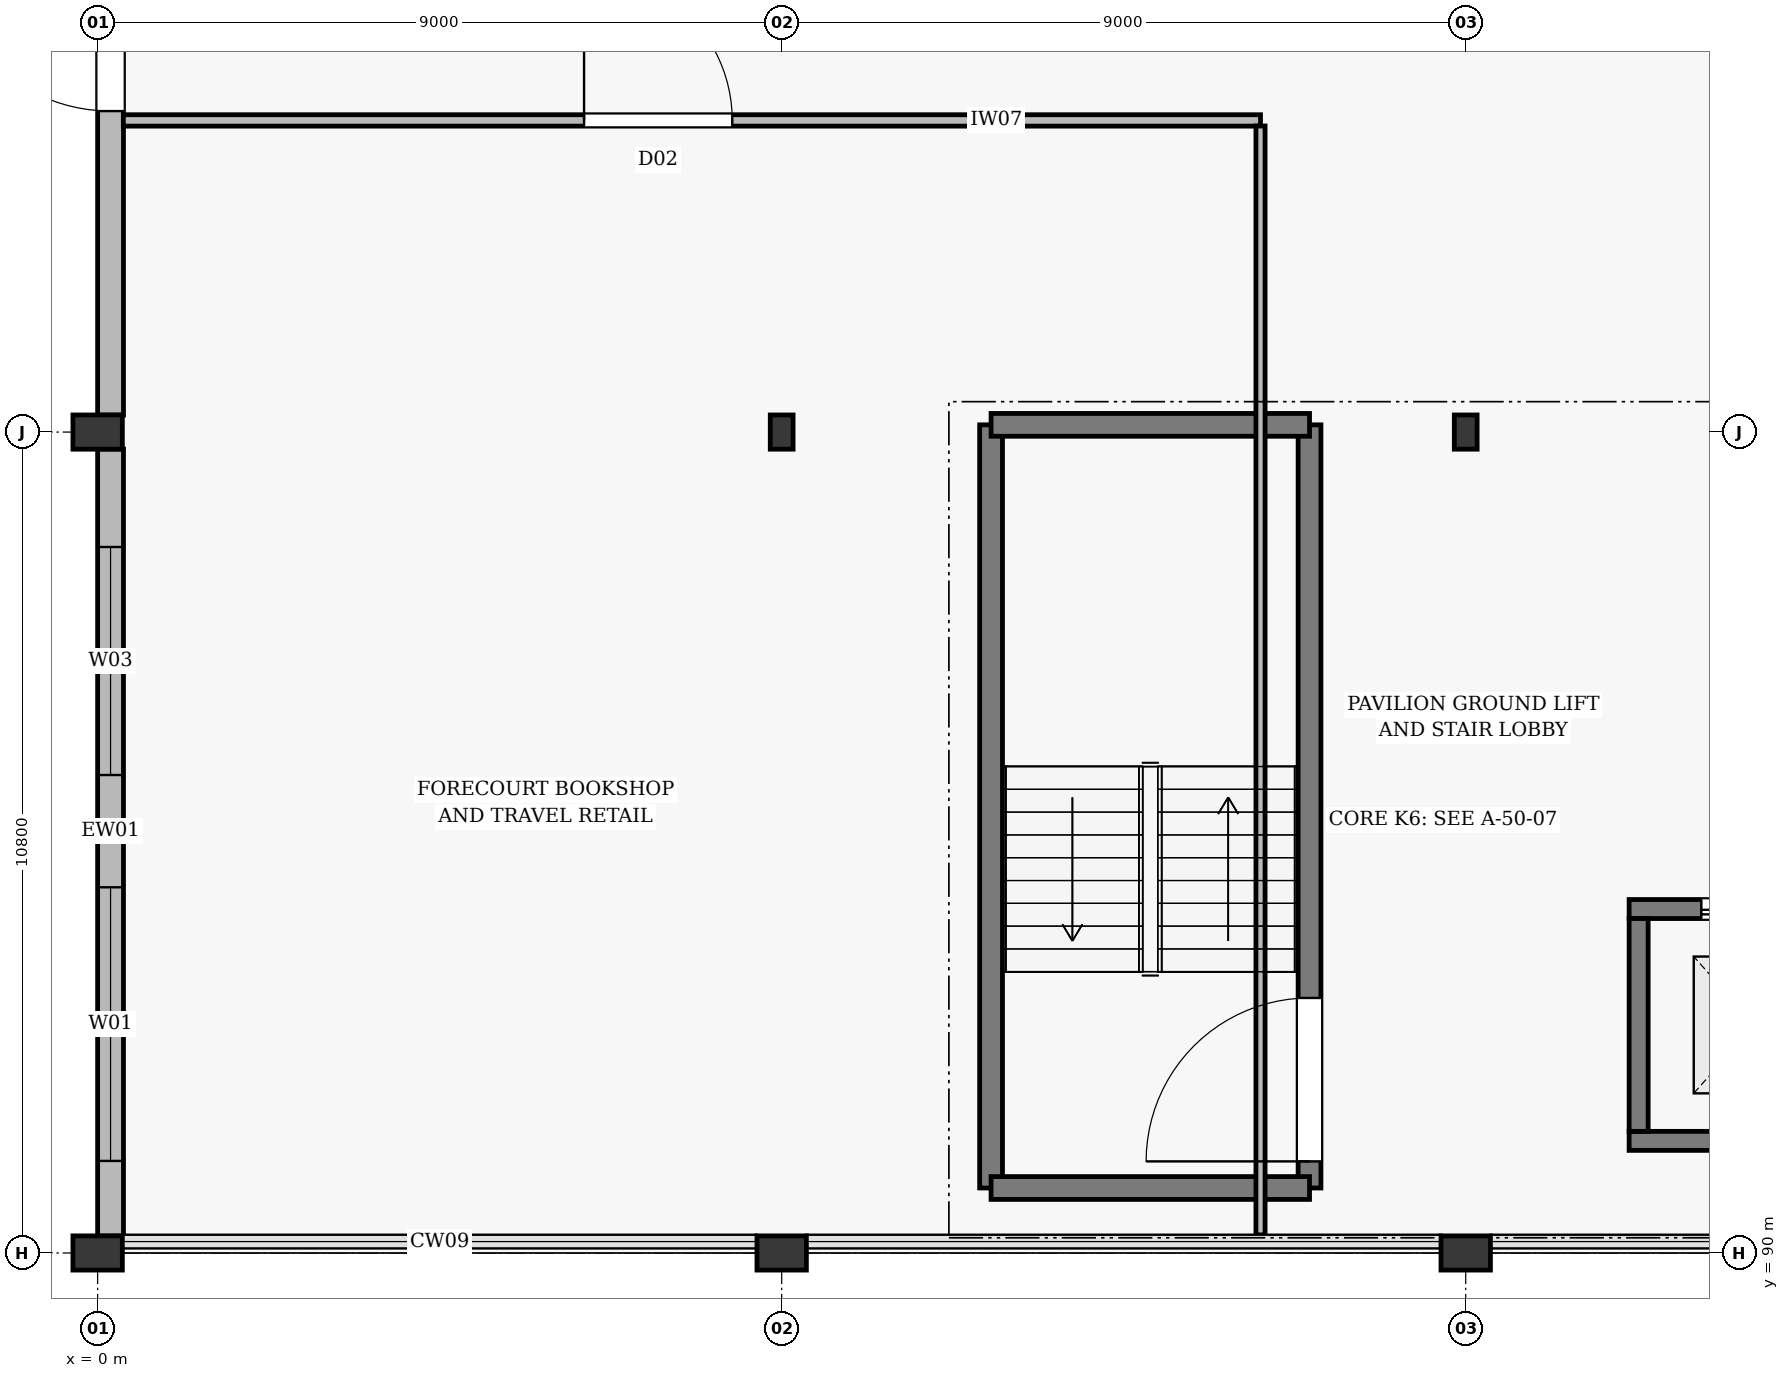
"""IFC4 building model, lengths in metres.
Left out: names, types, materials, properties, quantities, classifications, styles, units other than length and angle.
Written with IfcOpenShell. Run it as: python <this file> out.ifc"""

import sys

from ifc_helpers import new_model, si_unit, direction, frame, frame_2d, origin, origin_2d, place, context, subcontext, project, spatial, rectangle, i_section, extrude, element, fill, save


model = new_model("IFC4")
c1 = context("Model", 3, precision=1e-05, world=origin(), true_north=direction((0.0, 1.0)))
c2 = subcontext(c1, "Body", "Model", "MODEL_VIEW")
j1 = project(units=[si_unit("LENGTHUNIT", "METRE"), si_unit("PLANEANGLEUNIT", "RADIAN")], contexts=[c1])
p1 = place(None, origin())
s1 = spatial("IfcSite", under=j1, at=p1, CompositionType="ELEMENT")
p2 = place(p1, origin())
s2 = spatial("IfcBuilding", under=s1, at=p2, CompositionType="ELEMENT")
p3 = place(p2, origin())
s3 = spatial("IfcBuildingStorey", under=s2, at=p3, CompositionType="ELEMENT", Elevation=0.0)
for number, where, z_axis, x_axis in (
    (1, (0.0, 90.0, 0.0), (0.0, 0.0, 1.0), (1.0, 0.0, 0.0)),
    (2, (0.0, 100.8, 0.0), (0.0, 0.0, 1.0), (1.0, 0.0, 0.0)),
    (3, (9.0, 90.0, 0.0), (0.0, 0.0, 1.0), (1.0, 0.0, 0.0)),
):
    element("IfcColumn", number, at=place(p3, frame(where, z_axis=z_axis, x_axis=x_axis)), inside=s3, PredefinedType="PILASTER", context=c2, shape_type="SweptSolid", body=[
        extrude(rectangle(XDim=0.65, YDim=0.45, at=origin_2d()), origin(), (0.0, 0.0, 1.0), 6.6),
    ])
p4 = place(p3, frame((9.0, 100.8, 0.0), z_axis=(0.0, 0.0, 1.0), x_axis=(1.0, 0.0, 0.0)))
e4 = element("IfcColumn", 4, at=p4, inside=s3, PredefinedType="COLUMN", context=c2, shape_type="SweptSolid", body=[
    extrude(i_section(OverallWidth=0.3, OverallDepth=0.45, WebThickness=0.014, FlangeThickness=0.026, at=origin_2d()), origin(), (0.0, 0.0, 1.0), 6.6),
])
p5 = place(p3, frame((18.0, 90.0, 0.0), z_axis=(0.0, 0.0, 1.0), x_axis=(1.0, 0.0, 0.0)))
e5 = element("IfcColumn", 5, at=p5, inside=s3, PredefinedType="PILASTER", context=c2, shape_type="SweptSolid", body=[
    extrude(rectangle(XDim=0.65, YDim=0.45, at=origin_2d()), origin(), (0.0, 0.0, 1.0), 6.6),
])
p6 = place(p3, frame((18.0, 100.8, 0.0), z_axis=(0.0, 0.0, 1.0), x_axis=(1.0, 0.0, 0.0)))
e6 = element("IfcColumn", 6, at=p6, inside=s3, PredefinedType="COLUMN", context=c2, shape_type="SweptSolid", body=[
    extrude(i_section(OverallWidth=0.3, OverallDepth=0.45, WebThickness=0.014, FlangeThickness=0.026, at=origin_2d()), origin(), (0.0, 0.0, 1.0), 6.6),
])
p7 = place(p3, frame((0.17, 90.223, 0.0), z_axis=(0.0, 0.0, 1.0), x_axis=(0.0, 1.0, 0.0)))
e7 = element("IfcWall", 7, at=p7, inside=s3, PredefinedType="STANDARD", context=c2, shape_type="SweptSolid", body=[
    extrude(rectangle(XDim=10.354, YDim=0.34, at=frame_2d((5.177, 0.0))), origin(), (0.0, 0.0, 1.0), 5.85),
])
p8 = place(p7, frame((0.988, 0.0, 0.75)))
e8 = element("IfcOpeningElement", 8, at=p8, cuts=e7, PredefinedType="OPENING", context=c2, shape_type="SweptSolid", body=[
    extrude(rectangle(XDim=3.6, YDim=2.8, at=frame_2d((1.8, 1.4))), frame((0.0, 0.182, 0.0), z_axis=(0.0, -1.0, 0.0), x_axis=(1.0, 0.0, 0.0)), (0.0, 0.0, 1.0), 0.364),
])
p9 = place(p7, frame((6.065, 0.0, 0.75)))
e9 = element("IfcOpeningElement", 9, at=p9, cuts=e7, PredefinedType="OPENING", context=c2, shape_type="SweptSolid", body=[
    extrude(rectangle(XDim=3.0, YDim=2.6, at=frame_2d((1.5, 1.3))), frame((0.0, 0.182, 0.0), z_axis=(0.0, -1.0, 0.0), x_axis=(1.0, 0.0, 0.0)), (0.0, 0.0, 1.0), 0.364),
])
p10 = place(p3, frame((0.17, 101.023, 0.0), z_axis=(0.0, 0.0, 1.0), x_axis=(0.0, 1.0, 0.0)))
e10 = element("IfcWall", 10, at=p10, inside=s3, PredefinedType="STANDARD", context=c2, shape_type="SweptSolid", body=[
    extrude(rectangle(XDim=10.354, YDim=0.34, at=frame_2d((5.177, 0.0))), origin(), (0.0, 0.0, 1.0), 5.85),
])
p11 = place(p10, frame((4.0, 0.0, 0.005)))
e11 = element("IfcOpeningElement", 11, at=p11, cuts=e10, PredefinedType="OPENING", context=c2, shape_type="SweptSolid", body=[
    extrude(rectangle(XDim=2.2, YDim=2.45, at=frame_2d((1.1, 1.225))), frame((0.0, 0.182, 0.0), z_axis=(0.0, -1.0, 0.0), x_axis=(1.0, 0.0, 0.0)), (0.0, 0.0, 1.0), 0.364),
])
p12 = place(p3, frame((15.945, 90.855, 0.0), z_axis=(0.0, 0.0, 1.0), x_axis=(0.0, 1.0, 0.0)))
e12 = element("IfcWall", 12, at=p12, inside=s3, PredefinedType="SOLIDWALL", context=c2, shape_type="SweptSolid", body=[
    extrude(rectangle(XDim=10.04, YDim=0.3, at=frame_2d((5.02, 0.0))), origin(), (0.0, 0.0, 1.0), 6.6),
])
p13 = place(p12, frame((0.35, 0.0, 0.005)))
e13 = element("IfcOpeningElement", 13, at=p13, cuts=e12, PredefinedType="OPENING", context=c2, shape_type="SweptSolid", body=[
    extrude(rectangle(XDim=2.15, YDim=2.2, at=frame_2d((1.075, 1.1))), frame((0.0, 0.162, 0.0), z_axis=(0.0, -1.0, 0.0), x_axis=(1.0, 0.0, 0.0)), (0.0, 0.0, 1.0), 0.324),
])
p14 = place(p3, frame((11.755, 90.855, 0.0), z_axis=(0.0, 0.0, 1.0), x_axis=(0.0, 1.0, 0.0)))
e14 = element("IfcWall", 14, at=p14, inside=s3, PredefinedType="SOLIDWALL", context=c2, shape_type="SweptSolid", body=[
    extrude(rectangle(XDim=10.04, YDim=0.3, at=frame_2d((5.02, 0.0))), origin(), (0.0, 0.0, 1.0), 6.6),
])
for number, where, z_axis, x_axis in (
    (15, (15.945, 90.855, 0.0), (0.0, 0.0, 1.0), (-1.0, 0.0, 0.0)),
    (16, (15.945, 100.895, 0.0), (0.0, 0.0, 1.0), (-1.0, 0.0, 0.0)),
):
    element("IfcWall", number, at=place(p3, frame(where, z_axis=z_axis, x_axis=x_axis)), inside=s3, PredefinedType="SOLIDWALL", context=c2, shape_type="SweptSolid", body=[
        extrude(rectangle(XDim=4.19, YDim=0.3, at=frame_2d((2.095, 0.0))), origin(), (0.0, 0.0, 1.0), 6.6),
    ])
p15 = place(p3, frame((20.15, 91.475, 0.0), z_axis=(0.0, 0.0, 1.0), x_axis=(1.0, 0.0, 0.0)))
e17 = element("IfcWall", 17, at=p15, inside=s3, PredefinedType="SOLIDWALL", context=c2, shape_type="SweptSolid", body=[
    extrude(rectangle(XDim=3.3, YDim=0.25, at=frame_2d((1.65, 0.0))), origin(), (0.0, 0.0, 1.0), 6.6),
])
p16 = place(p3, frame((20.15, 94.525, 0.0), z_axis=(0.0, 0.0, 1.0), x_axis=(1.0, 0.0, 0.0)))
e18 = element("IfcWall", 18, at=p16, inside=s3, PredefinedType="SOLIDWALL", context=c2, shape_type="SweptSolid", body=[
    extrude(rectangle(XDim=3.3, YDim=0.25, at=frame_2d((1.65, 0.0))), origin(), (0.0, 0.0, 1.0), 6.6),
])
p17 = place(p16, frame((0.95, 0.0, 0.005)))
e19 = element("IfcOpeningElement", 19, at=p17, cuts=e18, PredefinedType="OPENING", context=c2, shape_type="SweptSolid", body=[
    extrude(rectangle(XDim=1.4, YDim=2.25, at=frame_2d((0.7, 1.125))), frame((0.0, 0.137, 0.0), z_axis=(0.0, -1.0, 0.0), x_axis=(1.0, 0.0, 0.0)), (0.0, 0.0, 1.0), 0.274),
])
p18 = place(p3, frame((20.275, 91.6, 0.0), z_axis=(0.0, 0.0, 1.0), x_axis=(0.0, 1.0, 0.0)))
e20 = element("IfcWall", 20, at=p18, inside=s3, PredefinedType="SOLIDWALL", context=c2, shape_type="SweptSolid", body=[
    extrude(rectangle(XDim=2.8, YDim=0.25, at=frame_2d((1.4, 0.0))), origin(), (0.0, 0.0, 1.0), 6.6),
])
p19 = place(p3, frame((0.338, 104.9, 0.0), z_axis=(0.0, 0.0, 1.0), x_axis=(1.0, 0.0, 0.0)))
e21 = element("IfcWall", 21, at=p19, inside=s3, PredefinedType="PARTITIONING", context=c2, shape_type="SweptSolid", body=[
    extrude(rectangle(XDim=14.962, YDim=0.15, at=frame_2d((7.481, 0.0))), origin(), (0.0, 0.0, 1.0), 5.89),
])
p20 = place(p19, frame((6.062, 0.0, 0.005)))
e22 = element("IfcOpeningElement", 22, at=p20, cuts=e21, PredefinedType="OPENING", context=c2, shape_type="SweptSolid", body=[
    extrude(rectangle(XDim=1.95, YDim=2.3, at=frame_2d((0.975, 1.15))), frame((0.0, 0.087, 0.0), z_axis=(0.0, -1.0, 0.0), x_axis=(1.0, 0.0, 0.0)), (0.0, 0.0, 1.0), 0.174),
])
p21 = place(p3, frame((15.3, 90.238, 0.0), z_axis=(0.0, 0.0, 1.0), x_axis=(0.0, 1.0, 0.0)))
e23 = element("IfcWall", 23, at=p21, inside=s3, PredefinedType="PARTITIONING", context=c2, shape_type="SweptSolid", body=[
    extrude(rectangle(XDim=14.589, YDim=0.12, at=frame_2d((7.294, 0.0))), origin(), (0.0, 0.0, 1.0), 5.84),
])
p22 = place(p8, origin())
e24 = element("IfcWindow", 24, at=p22, inside=s3, PartitioningType="DOUBLE_PANEL_VERTICAL", PredefinedType="WINDOW", context=c2, shape_type="SweptSolid", body=[
    extrude(rectangle(XDim=3.6, YDim=2.8, at=frame_2d((1.8, 1.4))), frame((0.0, 0.03, 0.0), z_axis=(0.0, -1.0, 0.0), x_axis=(1.0, 0.0, 0.0)), (0.0, 0.0, 1.0), 0.06),
])
fill(e8, e24)
p23 = place(p9, origin())
e25 = element("IfcWindow", 25, at=p23, inside=s3, PartitioningType="DOUBLE_PANEL_VERTICAL", PredefinedType="WINDOW", context=c2, shape_type="SweptSolid", body=[
    extrude(rectangle(XDim=3.0, YDim=2.6, at=frame_2d((1.5, 1.3))), frame((0.0, 0.03, 0.0), z_axis=(0.0, -1.0, 0.0), x_axis=(1.0, 0.0, 0.0)), (0.0, 0.0, 1.0), 0.06),
])
fill(e9, e25)
p24 = place(p11, origin())
e26 = element("IfcDoor", 26, at=p24, inside=s3, OperationType="SINGLE_SWING_RIGHT", PredefinedType="DOOR", context=c2, shape_type="SweptSolid", body=[
    extrude(rectangle(XDim=2.2, YDim=2.45, at=frame_2d((1.1, 1.225))), frame((0.0, 0.025, 0.0), z_axis=(0.0, -1.0, 0.0), x_axis=(1.0, 0.0, 0.0)), (0.0, 0.0, 1.0), 0.05),
])
fill(e11, e26)
p25 = place(p13, origin())
e27 = element("IfcDoor", 27, at=p25, inside=s3, OperationType="SINGLE_SWING_LEFT", PredefinedType="DOOR", context=c2, shape_type="SweptSolid", body=[
    extrude(rectangle(XDim=2.15, YDim=2.2, at=frame_2d((1.075, 1.1))), frame((0.0, 0.025, 0.0), z_axis=(0.0, -1.0, 0.0), x_axis=(1.0, 0.0, 0.0)), (0.0, 0.0, 1.0), 0.05),
])
fill(e13, e27)
p26 = place(p17, origin())
e28 = element("IfcDoor", 28, at=p26, inside=s3, OperationType="SLIDING_TO_LEFT", PredefinedType="DOOR", context=c2, shape_type="SweptSolid", body=[
    extrude(rectangle(XDim=1.4, YDim=2.25, at=frame_2d((0.7, 1.125))), frame((0.0, 0.025, 0.0), z_axis=(0.0, -1.0, 0.0), x_axis=(1.0, 0.0, 0.0)), (0.0, 0.0, 1.0), 0.05),
])
fill(e19, e28)
p27 = place(p20, origin())
e29 = element("IfcDoor", 29, at=p27, inside=s3, OperationType="DOUBLE_DOOR_SINGLE_SWING", PredefinedType="DOOR", context=c2, shape_type="SweptSolid", body=[
    extrude(rectangle(XDim=1.95, YDim=2.3, at=frame_2d((0.975, 1.15))), frame((0.0, 0.025, 0.0), z_axis=(0.0, -1.0, 0.0), x_axis=(1.0, 0.0, 0.0)), (0.0, 0.0, 1.0), 0.05),
])
fill(e22, e29)
save(model, sys.argv[1])
